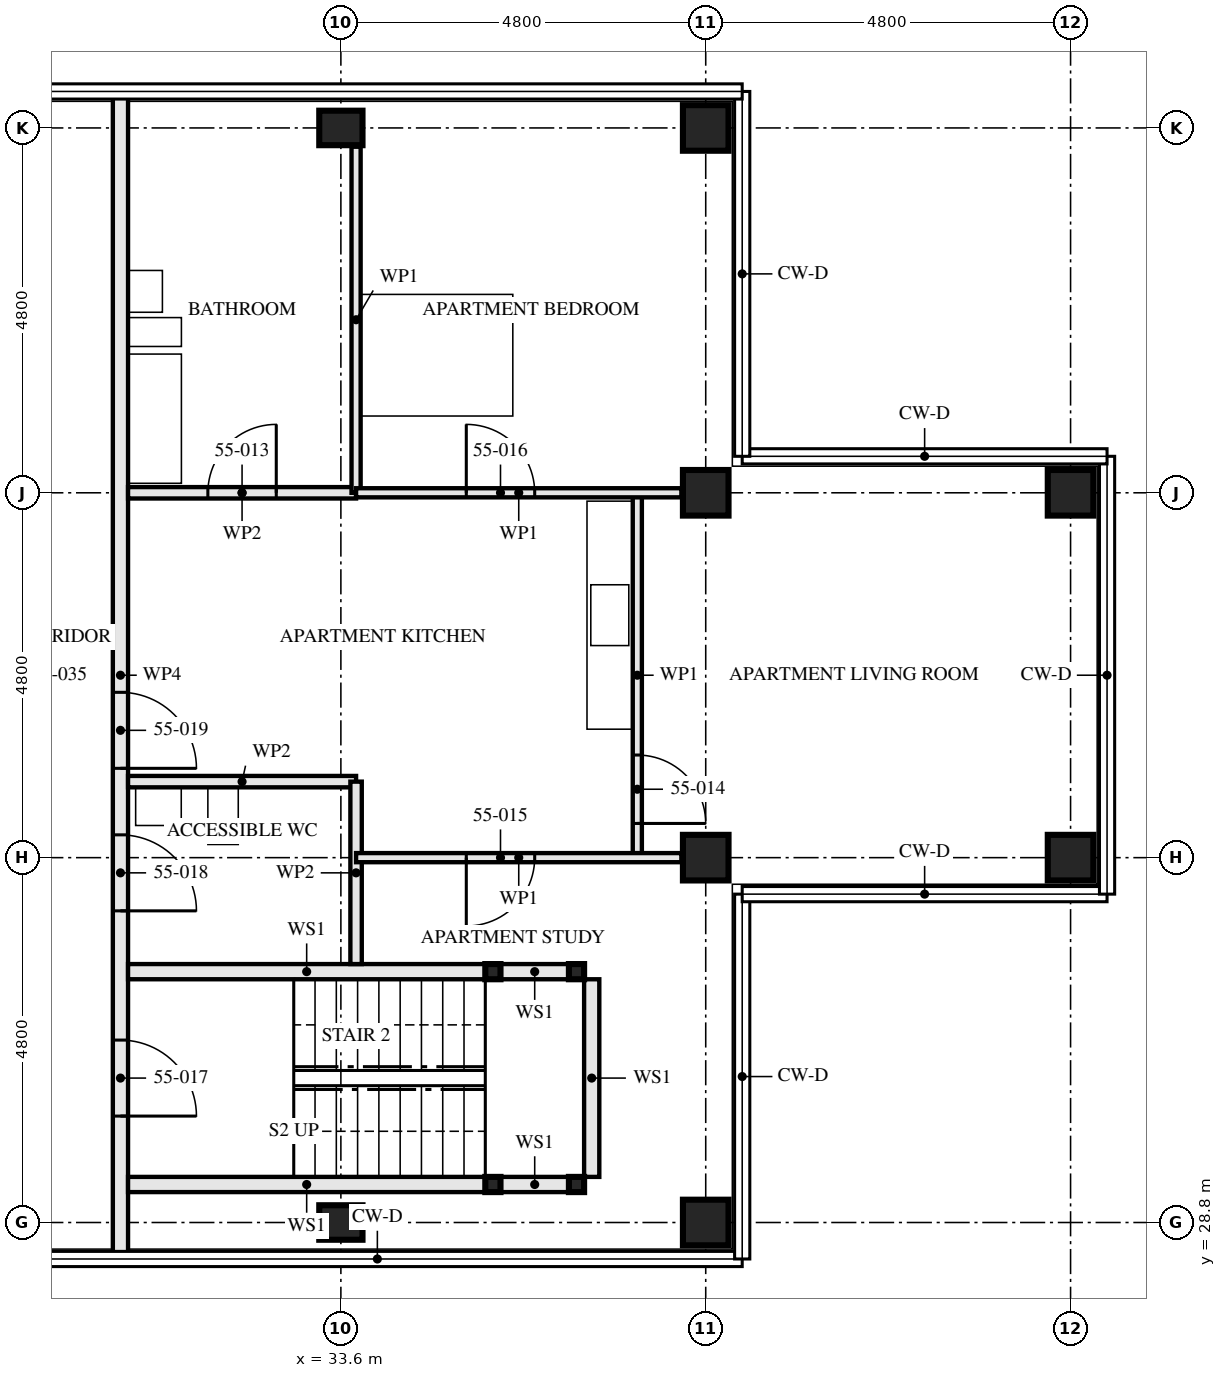
"""IFC4 building model, lengths in metres.
Left out: names, types, materials, properties, quantities, classifications, styles, units other than length and angle.
Written with IfcOpenShell. Run it as: python <this file> out.ifc"""

import sys

from ifc_helpers import new_model, si_unit, direction, frame, frame_2d, origin, origin_2d, place, context, subcontext, project, spatial, rectangle, hollow_rectangle, i_section, extrude, element, fill, save


model = new_model("IFC4")
c1 = context("Model", 3, precision=1e-05, world=origin(), true_north=direction((0.0, 1.0)))
c2 = subcontext(c1, "Body", "Model", "MODEL_VIEW")
j1 = project(units=[si_unit("LENGTHUNIT", "METRE"), si_unit("PLANEANGLEUNIT", "RADIAN")], contexts=[c1])
p1 = place(None, origin())
s1 = spatial("IfcSite", under=j1, at=p1, CompositionType="ELEMENT")
p2 = place(p1, origin())
s2 = spatial("IfcBuilding", under=s1, at=p2, CompositionType="ELEMENT")
p3 = place(p2, frame((0.0, 0.0, 201.5)))
s3 = spatial("IfcBuildingStorey", under=s2, at=p3, CompositionType="ELEMENT", Elevation=201.5)
for number, where, z_axis, x_axis in (
    (1, (33.6, 28.8, 0.0), (0.0, 0.0, 1.0), (0.0, 1.0, 0.0)),
    (2, (33.6, 43.2, 0.0), (0.0, 0.0, 1.0), (0.0, 1.0, 0.0)),
):
    element("IfcColumn", number, at=place(p3, frame(where, z_axis=z_axis, x_axis=x_axis)), inside=s3, PredefinedType="COLUMN", context=c2, shape_type="SweptSolid", body=[
        extrude(i_section(OverallWidth=0.454, OverallDepth=0.569, WebThickness=0.078, FlangeThickness=0.125, FilletRadius=0.015, at=origin_2d()), origin(), (0.0, 0.0, 1.0), 3.5),
    ])
for number, where, z_axis, x_axis in (
    (3, (38.4, 28.8, 0.0), (0.0, 0.0, 1.0), (0.0, 1.0, 0.0)),
    (4, (38.4, 33.6, 0.0), (0.0, 0.0, 1.0), (0.0, 1.0, 0.0)),
    (5, (38.4, 38.4, 0.0), (0.0, 0.0, 1.0), (0.0, 1.0, 0.0)),
    (6, (38.4, 43.2, 0.0), (0.0, 0.0, 1.0), (0.0, 1.0, 0.0)),
    (7, (43.2, 33.6, 0.0), (0.0, 0.0, 1.0), (0.0, 1.0, 0.0)),
    (8, (43.2, 38.4, 0.0), (0.0, 0.0, 1.0), (0.0, 1.0, 0.0)),
):
    element("IfcColumn", number, at=place(p3, frame(where, z_axis=z_axis, x_axis=x_axis)), inside=s3, PredefinedType="COLUMN", context=c2, shape_type="SweptSolid", body=[
        extrude(hollow_rectangle(XDim=0.6, YDim=0.6, WallThickness=0.05, at=origin_2d()), origin(), (0.0, 0.0, 1.0), 3.5),
    ])
for number, where, z_axis, x_axis in (
    (9, (36.7, 29.3, 0.0), (0.0, 0.0, 1.0), (1.0, 0.0, 0.0)),
    (10, (36.7, 32.1, 0.0), (0.0, 0.0, 1.0), (1.0, 0.0, 0.0)),
    (11, (35.6, 29.3, 0.0), (0.0, 0.0, 1.0), (1.0, 0.0, 0.0)),
    (12, (35.6, 32.1, 0.0), (0.0, 0.0, 1.0), (1.0, 0.0, 0.0)),
):
    element("IfcColumn", number, at=place(p3, frame(where, z_axis=z_axis, x_axis=x_axis)), inside=s3, PredefinedType="COLUMN", context=c2, shape_type="SweptSolid", body=[
        extrude(hollow_rectangle(XDim=0.2, YDim=0.2, WallThickness=0.008, at=origin_2d()), origin(), (0.0, 0.0, 1.0), 3.33),
    ])
p4 = place(p3, frame((36.6, 29.3, 0.0), z_axis=(0.0, 0.0, 1.0), x_axis=(-1.0, 0.0, 0.0)))
e13 = element("IfcWall", 13, at=p4, inside=s3, PredefinedType="SOLIDWALL", context=c2, shape_type="SweptSolid", body=[
    extrude(rectangle(XDim=0.9, YDim=0.2, at=frame_2d((0.45, 0.0))), origin(), (0.0, 0.0, 1.0), 2.99),
])
p5 = place(p3, frame((35.5, 29.3, 0.0), z_axis=(0.0, 0.0, 1.0), x_axis=(-1.0, 0.0, 0.0)))
e14 = element("IfcWall", 14, at=p5, inside=s3, PredefinedType="SOLIDWALL", context=c2, shape_type="SweptSolid", body=[
    extrude(rectangle(XDim=4.7, YDim=0.2, at=frame_2d((2.35, 0.0))), origin(), (0.0, 0.0, 1.0), 2.99),
])
p6 = place(p3, frame((36.6, 32.1, 0.0), z_axis=(0.0, 0.0, 1.0), x_axis=(-1.0, 0.0, 0.0)))
e15 = element("IfcWall", 15, at=p6, inside=s3, PredefinedType="SOLIDWALL", context=c2, shape_type="SweptSolid", body=[
    extrude(rectangle(XDim=0.9, YDim=0.2, at=frame_2d((0.45, 0.0))), origin(), (0.0, 0.0, 1.0), 2.99),
])
p7 = place(p3, frame((35.5, 32.1, 0.0), z_axis=(0.0, 0.0, 1.0), x_axis=(-1.0, 0.0, 0.0)))
e16 = element("IfcWall", 16, at=p7, inside=s3, PredefinedType="SOLIDWALL", context=c2, shape_type="SweptSolid", body=[
    extrude(rectangle(XDim=4.7, YDim=0.2, at=frame_2d((2.35, 0.0))), origin(), (0.0, 0.0, 1.0), 2.99),
])
p8 = place(p3, frame((36.9, 29.4, 0.0), z_axis=(0.0, 0.0, 1.0), x_axis=(0.0, 1.0, 0.0)))
e17 = element("IfcWall", 17, at=p8, inside=s3, PredefinedType="SOLIDWALL", context=c2, shape_type="SweptSolid", body=[
    extrude(rectangle(XDim=2.6, YDim=0.2, at=frame_2d((1.3, 0.0))), origin(), (0.0, 0.0, 1.0), 3.33),
])
p9 = place(p3, frame((33.8, 32.2, 0.0), z_axis=(0.0, 0.0, 1.0), x_axis=(0.0, 1.0, 0.0)))
e18 = element("IfcWall", 18, at=p9, inside=s3, PredefinedType="PARTITIONING", context=c2, shape_type="SweptSolid", body=[
    extrude(rectangle(XDim=2.4, YDim=0.15, at=frame_2d((1.2, 0.0))), origin(), (0.0, 0.0, 1.0), 2.55),
])
p10 = place(p3, frame((33.8, 34.6, 0.0), z_axis=(0.0, 0.0, 1.0), x_axis=(-1.0, 0.0, 0.0)))
e19 = element("IfcWall", 19, at=p10, inside=s3, PredefinedType="PARTITIONING", context=c2, shape_type="SweptSolid", body=[
    extrude(rectangle(XDim=3.0, YDim=0.15, at=frame_2d((1.5, 0.0))), origin(), (0.0, 0.0, 1.0), 3.33),
])
p11 = place(p3, frame((33.8, 38.4, 0.0), z_axis=(0.0, 0.0, 1.0), x_axis=(-1.0, 0.0, 0.0)))
e20 = element("IfcWall", 20, at=p11, inside=s3, PredefinedType="PARTITIONING", context=c2, shape_type="SweptSolid", body=[
    extrude(rectangle(XDim=3.0, YDim=0.15, at=frame_2d((1.5, 0.0))), origin(), (0.0, 0.0, 1.0), 2.55),
])
p12 = place(p11, frame((1.05, 0.0, 0.0)))
e21 = element("IfcOpeningElement", 21, at=p12, cuts=e20, PredefinedType="OPENING", context=c2, shape_type="SweptSolid", body=[
    extrude(rectangle(XDim=0.9, YDim=2.1, at=frame_2d((0.45, 1.05))), frame((0.0, 0.085, 0.0), z_axis=(0.0, -1.0, 0.0), x_axis=(1.0, 0.0, 0.0)), (0.0, 0.0, 1.0), 0.171),
])
p13 = place(p3, frame((37.5, 33.6, 0.0), z_axis=(0.0, 0.0, 1.0), x_axis=(0.0, 1.0, 0.0)))
e22 = element("IfcWall", 22, at=p13, inside=s3, PredefinedType="PARTITIONING", context=c2, shape_type="SweptSolid", body=[
    extrude(rectangle(XDim=4.8, YDim=0.12, at=frame_2d((2.4, 0.0))), origin(), (0.0, 0.0, 1.0), 3.33),
])
p14 = place(p13, frame((0.45, 0.0, 0.0)))
e23 = element("IfcOpeningElement", 23, at=p14, cuts=e22, PredefinedType="OPENING", context=c2, shape_type="SweptSolid", body=[
    extrude(rectangle(XDim=0.9, YDim=2.1, at=frame_2d((0.45, 1.05))), frame((0.0, 0.071, 0.0), z_axis=(0.0, -1.0, 0.0), x_axis=(1.0, 0.0, 0.0)), (0.0, 0.0, 1.0), 0.141),
])
p15 = place(p3, frame((33.8, 38.4, 0.0), z_axis=(0.0, 0.0, 1.0), x_axis=(0.0, 1.0, 0.0)))
e24 = element("IfcWall", 24, at=p15, inside=s3, PredefinedType="PARTITIONING", context=c2, shape_type="SweptSolid", body=[
    extrude(rectangle(XDim=4.553, YDim=0.12, at=frame_2d((2.276, 0.0))), origin(), (0.0, 0.0, 1.0), 3.33),
])
p16 = place(p3, frame((38.08, 33.6, 0.0), z_axis=(0.0, 0.0, 1.0), x_axis=(-1.0, 0.0, 0.0)))
e25 = element("IfcWall", 25, at=p16, inside=s3, PredefinedType="PARTITIONING", context=c2, shape_type="SweptSolid", body=[
    extrude(rectangle(XDim=4.28, YDim=0.12, at=frame_2d((2.14, 0.0))), origin(), (0.0, 0.0, 1.0), 2.55),
])
p17 = place(p16, frame((1.93, 0.0, 0.0)))
e26 = element("IfcOpeningElement", 26, at=p17, cuts=e25, PredefinedType="OPENING", context=c2, shape_type="SweptSolid", body=[
    extrude(rectangle(XDim=0.9, YDim=2.1, at=frame_2d((0.45, 1.05))), frame((0.0, 0.071, 0.0), z_axis=(0.0, -1.0, 0.0), x_axis=(1.0, 0.0, 0.0)), (0.0, 0.0, 1.0), 0.141),
])
p18 = place(p3, frame((38.08, 38.4, 0.0), z_axis=(0.0, 0.0, 1.0), x_axis=(-1.0, 0.0, 0.0)))
e27 = element("IfcWall", 27, at=p18, inside=s3, PredefinedType="PARTITIONING", context=c2, shape_type="SweptSolid", body=[
    extrude(rectangle(XDim=4.28, YDim=0.12, at=frame_2d((2.14, 0.0))), origin(), (0.0, 0.0, 1.0), 2.55),
])
p19 = place(p18, frame((1.93, 0.0, 0.0)))
e28 = element("IfcOpeningElement", 28, at=p19, cuts=e27, PredefinedType="OPENING", context=c2, shape_type="SweptSolid", body=[
    extrude(rectangle(XDim=0.9, YDim=2.1, at=frame_2d((0.45, 1.05))), frame((0.0, 0.071, 0.0), z_axis=(0.0, -1.0, 0.0), x_axis=(1.0, 0.0, 0.0)), (0.0, 0.0, 1.0), 0.141),
])
p20 = place(p3, frame((30.7, 28.345, 0.0), z_axis=(0.0, 0.0, 1.0), x_axis=(0.0, 1.0, 0.0)))
e29 = element("IfcWall", 29, at=p20, inside=s3, PredefinedType="PARTITIONING", context=c2, shape_type="SweptSolid", body=[
    extrude(rectangle(XDim=15.31, YDim=0.2, at=frame_2d((7.655, 0.0))), origin(), (0.0, 0.0, 1.0), 2.32),
])
p21 = place(p20, frame((1.855, 0.0, 0.0)))
e30 = element("IfcOpeningElement", 30, at=p21, cuts=e29, PredefinedType="OPENING", context=c2, shape_type="SweptSolid", body=[
    extrude(rectangle(XDim=1.0, YDim=2.1, at=frame_2d((0.5, 1.05))), frame((0.0, 0.111, 0.0), z_axis=(0.0, -1.0, 0.0), x_axis=(1.0, 0.0, 0.0)), (0.0, 0.0, 1.0), 0.221),
])
p22 = place(p20, frame((4.555, 0.0, 0.0)))
e31 = element("IfcOpeningElement", 31, at=p22, cuts=e29, PredefinedType="OPENING", context=c2, shape_type="SweptSolid", body=[
    extrude(rectangle(XDim=1.0, YDim=2.1, at=frame_2d((0.5, 1.05))), frame((0.0, 0.111, 0.0), z_axis=(0.0, -1.0, 0.0), x_axis=(1.0, 0.0, 0.0)), (0.0, 0.0, 1.0), 0.221),
])
p23 = place(p20, frame((6.43, 0.0, 0.0)))
e32 = element("IfcOpeningElement", 32, at=p23, cuts=e29, PredefinedType="OPENING", context=c2, shape_type="SweptSolid", body=[
    extrude(rectangle(XDim=1.0, YDim=2.1, at=frame_2d((0.5, 1.05))), frame((0.0, 0.111, 0.0), z_axis=(0.0, -1.0, 0.0), x_axis=(1.0, 0.0, 0.0)), (0.0, 0.0, 1.0), 0.221),
])
p24 = place(p12, frame((0.9, 0.0, 0.0), z_axis=(0.0, 0.0, 1.0), x_axis=(-1.0, 0.0, 0.0)))
e33 = element("IfcDoor", 33, at=p24, inside=s3, OperationType="SINGLE_SWING_LEFT", PredefinedType="DOOR", context=c2, shape_type="SweptSolid", body=[
    extrude(rectangle(XDim=0.9, YDim=2.1, at=frame_2d((0.45, 1.05))), frame((0.0, 0.022, 0.0), z_axis=(0.0, -1.0, 0.0), x_axis=(1.0, 0.0, 0.0)), (0.0, 0.0, 1.0), 0.044),
])
fill(e21, e33)
p25 = place(p14, frame((0.9, 0.0, 0.0), z_axis=(0.0, 0.0, 1.0), x_axis=(-1.0, 0.0, 0.0)))
e34 = element("IfcDoor", 34, at=p25, inside=s3, OperationType="SINGLE_SWING_LEFT", PredefinedType="DOOR", context=c2, shape_type="SweptSolid", body=[
    extrude(rectangle(XDim=0.9, YDim=2.1, at=frame_2d((0.45, 1.05))), frame((0.0, 0.022, 0.0), z_axis=(0.0, -1.0, 0.0), x_axis=(1.0, 0.0, 0.0)), (0.0, 0.0, 1.0), 0.044),
])
fill(e23, e34)
p26 = place(p17, origin())
e35 = element("IfcDoor", 35, at=p26, inside=s3, OperationType="SINGLE_SWING_LEFT", PredefinedType="DOOR", context=c2, shape_type="SweptSolid", body=[
    extrude(rectangle(XDim=0.9, YDim=2.1, at=frame_2d((0.45, 1.05))), frame((0.0, 0.022, 0.0), z_axis=(0.0, -1.0, 0.0), x_axis=(1.0, 0.0, 0.0)), (0.0, 0.0, 1.0), 0.044),
])
fill(e26, e35)
p27 = place(p19, frame((0.9, 0.0, 0.0), z_axis=(0.0, 0.0, 1.0), x_axis=(-1.0, 0.0, 0.0)))
e36 = element("IfcDoor", 36, at=p27, inside=s3, OperationType="SINGLE_SWING_RIGHT", PredefinedType="DOOR", context=c2, shape_type="SweptSolid", body=[
    extrude(rectangle(XDim=0.9, YDim=2.1, at=frame_2d((0.45, 1.05))), frame((0.0, 0.022, 0.0), z_axis=(0.0, -1.0, 0.0), x_axis=(1.0, 0.0, 0.0)), (0.0, 0.0, 1.0), 0.044),
])
fill(e28, e36)
p28 = place(p21, frame((1.0, 0.0, 0.0), z_axis=(0.0, 0.0, 1.0), x_axis=(-1.0, 0.0, 0.0)))
e37 = element("IfcDoor", 37, at=p28, inside=s3, OperationType="SINGLE_SWING_LEFT", PredefinedType="DOOR", context=c2, shape_type="SweptSolid", body=[
    extrude(rectangle(XDim=1.0, YDim=2.1, at=frame_2d((0.5, 1.05))), frame((0.0, 0.032, 0.0), z_axis=(0.0, -1.0, 0.0), x_axis=(1.0, 0.0, 0.0)), (0.0, 0.0, 1.0), 0.064),
])
fill(e30, e37)
p29 = place(p22, frame((1.0, 0.0, 0.0), z_axis=(0.0, 0.0, 1.0), x_axis=(-1.0, 0.0, 0.0)))
e38 = element("IfcDoor", 38, at=p29, inside=s3, OperationType="SINGLE_SWING_LEFT", PredefinedType="DOOR", context=c2, shape_type="SweptSolid", body=[
    extrude(rectangle(XDim=1.0, YDim=2.1, at=frame_2d((0.5, 1.05))), frame((0.0, 0.027, 0.0), z_axis=(0.0, -1.0, 0.0), x_axis=(1.0, 0.0, 0.0)), (0.0, 0.0, 1.0), 0.054),
])
fill(e31, e38)
p30 = place(p23, frame((1.0, 0.0, 0.0), z_axis=(0.0, 0.0, 1.0), x_axis=(-1.0, 0.0, 0.0)))
e39 = element("IfcDoor", 39, at=p30, inside=s3, OperationType="SINGLE_SWING_LEFT", PredefinedType="DOOR", context=c2, shape_type="SweptSolid", body=[
    extrude(rectangle(XDim=1.0, YDim=2.1, at=frame_2d((0.5, 1.05))), frame((0.0, 0.027, 0.0), z_axis=(0.0, -1.0, 0.0), x_axis=(1.0, 0.0, 0.0)), (0.0, 0.0, 1.0), 0.054),
])
fill(e32, e39)
save(model, sys.argv[1])
